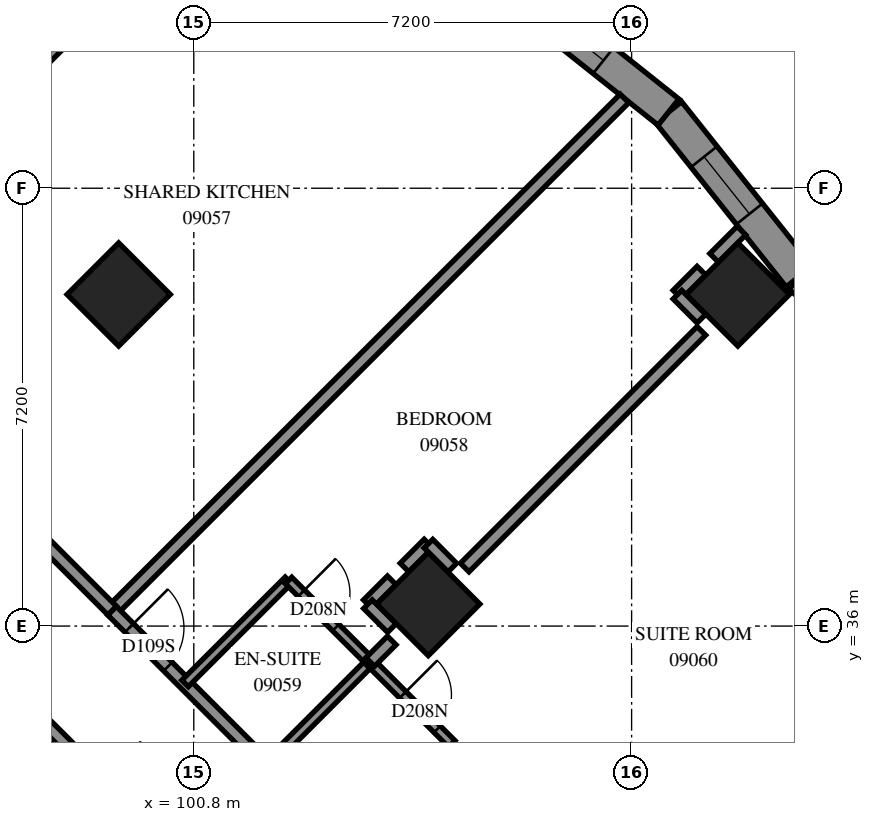
"""IFC4 building model, lengths in metres.
Left out: names, types, materials, properties, quantities, classifications, styles, units other than length and angle.
Written with IfcOpenShell. Run it as: python <this file> out.ifc"""

import sys

from ifc_helpers import new_model, si_unit, direction, frame, frame_2d, origin, origin_2d, place, context, subcontext, project, spatial, polyline, rectangle, outline, extrude, element, fill, save


model = new_model("IFC4")
c1 = context("Model", 3, precision=1e-05, world=origin(), true_north=direction((0.0, 1.0)))
c2 = subcontext(c1, "Body", "Model", "MODEL_VIEW")
j1 = project(units=[si_unit("LENGTHUNIT", "METRE"), si_unit("PLANEANGLEUNIT", "RADIAN")], contexts=[c1])
p1 = place(None, origin())
s1 = spatial("IfcSite", under=j1, at=p1, CompositionType="ELEMENT")
p2 = place(p1, origin())
s2 = spatial("IfcBuilding", under=s1, at=p2, CompositionType="ELEMENT")
p3 = place(p2, frame((0.0, 0.0, 37.2)))
s3 = spatial("IfcBuildingStorey", under=s2, at=p3, CompositionType="ELEMENT", Elevation=37.2)
for number, where, z_axis, x_axis in (
    (1, (99.565, 41.453, 0.0), (0.0, 0.0, 1.0), (0.707, -0.707, 0.0)),
    (2, (109.747, 41.453, 0.0), (0.0, 0.0, 1.0), (0.707, -0.707, 0.0)),
    (3, (104.656, 36.362, 0.0), (0.0, 0.0, 1.0), (0.707, -0.707, 0.0)),
):
    element("IfcColumn", number, at=place(p3, frame(where, z_axis=z_axis, x_axis=x_axis)), inside=s3, PredefinedType="COLUMN", context=c2, shape_type="SweptSolid", body=[
        extrude(rectangle(XDim=1.2, YDim=1.2, at=origin_2d()), origin(), (0.0, 0.0, 1.0), 3.1),
    ])
p4 = place(p3, frame((113.46, 39.599, 0.0), z_axis=(0.0, 0.0, 1.0), x_axis=(-0.7826141976, 0.6225070424, 0.0)))
e4 = element("IfcWall", 4, at=p4, inside=s3, PredefinedType="SOLIDWALL", context=c2, shape_type="SweptSolid", body=[
    extrude(outline(polyline([(-0.031, -0.275), (3.423, -0.275), (3.485, 0.275), (0.031, 0.275), (-0.031, -0.275)])), origin(), (0.0, 0.0, 1.0), 3.1),
])
p5 = place(p4, frame((1.196, 0.0, 0.5)))
e5 = element("IfcOpeningElement", 5, at=p5, cuts=e4, PredefinedType="OPENING", context=c2, shape_type="SweptSolid", body=[
    extrude(rectangle(XDim=1.2, YDim=2.45, at=frame_2d((0.6, 1.225))), frame((0.0, 0.285, 0.0), z_axis=(0.0, -1.0, 0.0), x_axis=(1.0, 0.0, 0.0)), (0.0, 0.0, 1.0), 0.57),
])
p6 = place(p3, frame((110.757, 41.749, 0.0), z_axis=(0.0, 0.0, 1.0), x_axis=(-0.6225211477, 0.7826029777, 0.0)))
e6 = element("IfcWall", 6, at=p6, inside=s3, PredefinedType="SOLIDWALL", context=c2, shape_type="SweptSolid", body=[
    extrude(outline(polyline([(0.031, -0.275), (3.485, -0.275), (3.423, 0.275), (-0.031, 0.275), (0.031, -0.275)])), origin(), (0.0, 0.0, 1.0), 3.1),
])
p7 = place(p6, frame((1.315, 0.0, 0.5)))
e7 = element("IfcOpeningElement", 7, at=p7, cuts=e6, PredefinedType="OPENING", context=c2, shape_type="SweptSolid", body=[
    extrude(rectangle(XDim=1.2, YDim=2.45, at=frame_2d((0.6, 1.225))), frame((0.0, 0.285, 0.0), z_axis=(0.0, -1.0, 0.0), x_axis=(1.0, 0.0, 0.0)), (0.0, 0.0, 1.0), 0.57),
])
p8 = place(p3, frame((108.607, 44.452, 0.0), z_axis=(0.0, 0.0, 1.0), x_axis=(-0.7826141976, 0.6225070424, 0.0)))
e8 = element("IfcWall", 8, at=p8, inside=s3, PredefinedType="SOLIDWALL", context=c2, shape_type="SweptSolid", body=[
    extrude(outline(polyline([(-0.031, -0.275), (3.423, -0.275), (3.485, 0.275), (0.031, 0.275), (-0.031, -0.275)])), origin(), (0.0, 0.0, 1.0), 3.1),
])
p9 = place(p8, frame((1.366, 0.0, 0.5)))
e9 = element("IfcOpeningElement", 9, at=p9, cuts=e8, PredefinedType="OPENING", context=c2, shape_type="SweptSolid", body=[
    extrude(rectangle(XDim=1.2, YDim=2.45, at=frame_2d((0.6, 1.225))), frame((0.0, 0.285, 0.0), z_axis=(0.0, -1.0, 0.0), x_axis=(1.0, 0.0, 0.0)), (0.0, 0.0, 1.0), 0.57),
])
p10 = place(p3, frame((99.459, 36.255, 0.0), z_axis=(0.0, 0.0, 1.0), x_axis=(0.7071907307, 0.7070228217, 0.0)))
e10 = element("IfcWall", 10, at=p10, inside=s3, PredefinedType="PARTITIONING", context=c2, shape_type="SweptSolid", body=[
    extrude(rectangle(XDim=11.911, YDim=0.2, at=frame_2d((5.956, 0.0))), origin(), (0.0, 0.0, 1.0), 3.1),
])
p11 = place(p3, frame((94.367, 41.349, 0.0), z_axis=(0.0, 0.0, 1.0), x_axis=(0.7071109931, 0.7071025693, 0.0)))
e11 = element("IfcWall", 11, at=p11, inside=s3, PredefinedType="PARTITIONING", context=c2, shape_type="SweptSolid", body=[
    extrude(rectangle(XDim=11.871, YDim=0.2, at=frame_2d((5.936, 0.0))), origin(), (0.0, 0.0, 1.0), 3.1),
])
p12 = place(p3, frame((93.59, 42.126, 0.0), z_axis=(0.0, 0.0, 1.0), x_axis=(0.7071067812, 0.7071067812, 0.0)))
e12 = element("IfcWall", 12, at=p12, inside=s3, PredefinedType="PARTITIONING", context=c2, shape_type="SweptSolid", body=[
    extrude(rectangle(XDim=9.849, YDim=0.2, at=frame_2d((4.924, 0.0))), origin(), (0.0, 0.0, 1.0), 3.1),
])
p13 = place(p12, frame((0.148, 0.0, 0.0)))
e13 = element("IfcOpeningElement", 13, at=p13, cuts=e12, PredefinedType="OPENING", context=c2, shape_type="SweptSolid", body=[
    extrude(rectangle(XDim=1.0, YDim=2.1, at=frame_2d((0.5, 1.05))), frame((0.0, 0.11, 0.0), z_axis=(0.0, -1.0, 0.0), x_axis=(1.0, 0.0, 0.0)), (0.0, 0.0, 1.0), 0.22),
])
p14 = place(p3, frame((99.455, 36.253, 0.0), z_axis=(0.0, 0.0, 1.0), x_axis=(0.7071067812, -0.7071067812, 0.0)))
e14 = element("IfcWall", 14, at=p14, inside=s3, PredefinedType="PARTITIONING", context=c2, shape_type="SweptSolid", body=[
    extrude(rectangle(XDim=7.201, YDim=0.2, at=frame_2d((3.601, 0.0))), origin(), (0.0, 0.0, 1.0), 3.1),
])
p15 = place(p14, frame((0.401, 0.0, 0.0)))
e15 = element("IfcOpeningElement", 15, at=p15, cuts=e14, PredefinedType="OPENING", context=c2, shape_type="SweptSolid", body=[
    extrude(rectangle(XDim=0.9, YDim=2.1, at=frame_2d((0.45, 1.05))), frame((0.0, 0.11, 0.0), z_axis=(0.0, -1.0, 0.0), x_axis=(1.0, 0.0, 0.0)), (0.0, 0.0, 1.0), 0.22),
])
for number, where, z_axis, x_axis in (
    (16, (110.345, 31.871, 0.0), (0.0, 0.0, 1.0), (0.707, 0.707, 0.0)),
    (17, (105.255, 36.963, 0.0), (0.0, 0.0, 1.0), (0.707, 0.707, 0.0)),
):
    element("IfcWall", number, at=place(p3, frame(where, z_axis=z_axis, x_axis=x_axis)), inside=s3, PredefinedType="PARTITIONING", context=c2, shape_type="SweptSolid", body=[
        extrude(rectangle(XDim=5.504, YDim=0.2, at=frame_2d((2.752, 0.0))), origin(), (0.0, 0.0, 1.0), 3.1),
    ])
p16 = place(p3, frame((96.913, 38.801, 0.0), z_axis=(0.0, 0.0, 1.0), x_axis=(0.7068288851, -0.7073845681, 0.0)))
e18 = element("IfcWall", 18, at=p16, inside=s3, PredefinedType="PARTITIONING", context=c2, shape_type="SweptSolid", body=[
    extrude(rectangle(XDim=3.599, YDim=0.2, at=frame_2d((1.8, 0.0))), origin(), (0.0, 0.0, 1.0), 3.1),
])
p17 = place(p3, frame((97.976, 34.772, 0.0), z_axis=(0.0, 0.0, 1.0), x_axis=(0.7073845681, -0.7068288851, 0.0)))
e19 = element("IfcWall", 19, at=p17, inside=s3, PredefinedType="PARTITIONING", context=c2, shape_type="SweptSolid", body=[
    extrude(rectangle(XDim=3.599, YDim=0.2, at=frame_2d((1.8, 0.0))), origin(), (0.0, 0.0, 1.0), 3.1),
])
p18 = place(p17, frame((1.858, 0.0, 0.0)))
e20 = element("IfcOpeningElement", 20, at=p18, cuts=e19, PredefinedType="OPENING", context=c2, shape_type="SweptSolid", body=[
    extrude(rectangle(XDim=0.9, YDim=2.1, at=frame_2d((0.45, 1.05))), frame((0.0, 0.11, 0.0), z_axis=(0.0, -1.0, 0.0), x_axis=(1.0, 0.0, 0.0)), (0.0, 0.0, 1.0), 0.22),
])
p19 = place(p3, frame((102.003, 33.711, 0.0), z_axis=(0.0, 0.0, 1.0), x_axis=(0.7071067812, 0.7071067812, 0.0)))
e21 = element("IfcWall", 21, at=p19, inside=s3, PredefinedType="PARTITIONING", context=c2, shape_type="SweptSolid", body=[
    extrude(rectangle(XDim=2.401, YDim=0.15, at=frame_2d((1.201, 0.0))), origin(), (0.0, 0.0, 1.0), 3.1),
])
for number, where, z_axis, x_axis in (
    (22, (100.657, 35.057, 0.0), (0.0, 0.0, 1.0), (0.708, 0.707, 0.0)),
    (23, (103.349, 32.365, 0.0), (0.0, 0.0, 1.0), (0.707, 0.708, 0.0)),
):
    element("IfcWall", number, at=place(p3, frame(where, z_axis=z_axis, x_axis=x_axis)), inside=s3, PredefinedType="PARTITIONING", context=c2, shape_type="SweptSolid", body=[
        extrude(rectangle(XDim=2.4, YDim=0.15, at=frame_2d((1.2, 0.0))), origin(), (0.0, 0.0, 1.0), 3.1),
    ])
p20 = place(p3, frame((103.701, 35.407, 0.0), z_axis=(0.0, 0.0, 1.0), x_axis=(0.7065800724, -0.7076330979, 0.0)))
e24 = element("IfcWall", 24, at=p20, inside=s3, PredefinedType="PARTITIONING", context=c2, shape_type="SweptSolid", body=[
    extrude(rectangle(XDim=1.899, YDim=0.15, at=frame_2d((0.95, 0.0))), origin(), (0.0, 0.0, 1.0), 3.1),
])
p21 = place(p20, frame((0.759, 0.0, 0.0)))
e25 = element("IfcOpeningElement", 25, at=p21, cuts=e24, PredefinedType="OPENING", context=c2, shape_type="SweptSolid", body=[
    extrude(rectangle(XDim=0.8, YDim=2.1, at=frame_2d((0.4, 1.05))), frame((0.0, 0.085, 0.0), z_axis=(0.0, -1.0, 0.0), x_axis=(1.0, 0.0, 0.0)), (0.0, 0.0, 1.0), 0.17),
])
p22 = place(p3, frame((102.358, 36.75, 0.0), z_axis=(0.0, 0.0, 1.0), x_axis=(0.7076330979, -0.7065800724, 0.0)))
e26 = element("IfcWall", 26, at=p22, inside=s3, PredefinedType="PARTITIONING", context=c2, shape_type="SweptSolid", body=[
    extrude(rectangle(XDim=1.899, YDim=0.15, at=frame_2d((0.95, 0.0))), origin(), (0.0, 0.0, 1.0), 3.1),
])
p23 = place(p22, frame((0.296, 0.0, 0.0)))
e27 = element("IfcOpeningElement", 27, at=p23, cuts=e26, PredefinedType="OPENING", context=c2, shape_type="SweptSolid", body=[
    extrude(rectangle(XDim=0.8, YDim=2.1, at=frame_2d((0.4, 1.05))), frame((0.0, 0.085, 0.0), z_axis=(0.0, -1.0, 0.0), x_axis=(1.0, 0.0, 0.0)), (0.0, 0.0, 1.0), 0.17),
])
p24 = place(p3, frame((109.357, 42.055, 0.0), z_axis=(0.0, 0.0, 1.0), x_axis=(0.7071067812, 0.7071067812, 0.0)))
e28 = element("IfcWall", 28, at=p24, inside=s3, PredefinedType="PARTITIONING", context=c2, shape_type="SweptSolid", body=[
    extrude(rectangle(XDim=0.634, YDim=0.2, at=frame_2d((0.317, 0.0))), origin(), (0.0, 0.0, 1.0), 3.1),
])
for number, where, z_axis, x_axis in (
    (29, (108.753, 41.451, 0.0), (0.0, 0.0, 1.0), (0.707, 0.707, 0.0)),
    (30, (108.754, 41.45, 0.0), (0.0, 0.0, 1.0), (0.707, -0.707, 0.0)),
    (31, (103.661, 36.359, 0.0), (0.0, 0.0, 1.0), (0.707, 0.707, 0.0)),
    (32, (104.265, 36.963, 0.0), (0.0, 0.0, 1.0), (0.707, 0.707, 0.0)),
):
    element("IfcWall", number, at=place(p3, frame(where, z_axis=z_axis, x_axis=x_axis)), inside=s3, PredefinedType="PARTITIONING", context=c2, shape_type="SweptSolid", body=[
        extrude(rectangle(XDim=0.557, YDim=0.2, at=frame_2d((0.279, 0.0))), origin(), (0.0, 0.0, 1.0), 3.1),
    ])
for number, where, z_axis, x_axis in (
    (33, (104.659, 37.355, 0.0), (0.0, 0.0, 1.0), (0.705, -0.709, 0.0)),
    (34, (103.664, 36.36, 0.0), (0.0, 0.0, 1.0), (0.709, -0.705, 0.0)),
):
    element("IfcWall", number, at=place(p3, frame(where, z_axis=z_axis, x_axis=x_axis)), inside=s3, PredefinedType="PARTITIONING", context=c2, shape_type="SweptSolid", body=[
        extrude(rectangle(XDim=0.556, YDim=0.2, at=frame_2d((0.278, 0.0))), origin(), (0.0, 0.0, 1.0), 3.1),
    ])
p25 = place(p3, frame((103.701, 35.409, 0.0), z_axis=(0.0, 0.0, 1.0), x_axis=(0.7071067812, 0.7071067812, 0.0)))
e35 = element("IfcWall", 35, at=p25, inside=s3, PredefinedType="PARTITIONING", context=c2, shape_type="SweptSolid", body=[
    extrude(rectangle(XDim=0.501, YDim=0.2, at=frame_2d((0.25, 0.0))), origin(), (0.0, 0.0, 1.0), 3.1),
])
p26 = place(p7, origin())
e36 = element("IfcWindow", 36, at=p26, inside=s3, PartitioningType="SINGLE_PANEL", PredefinedType="WINDOW", context=c2, shape_type="SweptSolid", body=[
    extrude(rectangle(XDim=1.2, YDim=2.45, at=frame_2d((0.6, 1.225))), frame((0.0, 0.155, 0.0), z_axis=(0.0, -1.0, 0.0), x_axis=(1.0, 0.0, 0.0)), (0.0, 0.0, 1.0), 0.06),
])
fill(e7, e36)
p27 = place(p9, origin())
e37 = element("IfcWindow", 37, at=p27, inside=s3, PartitioningType="SINGLE_PANEL", PredefinedType="WINDOW", context=c2, shape_type="SweptSolid", body=[
    extrude(rectangle(XDim=1.2, YDim=2.45, at=frame_2d((0.6, 1.225))), frame((0.0, 0.155, 0.0), z_axis=(0.0, -1.0, 0.0), x_axis=(1.0, 0.0, 0.0)), (0.0, 0.0, 1.0), 0.06),
])
fill(e9, e37)
p28 = place(p15, origin())
e38 = element("IfcDoor", 38, at=p28, inside=s3, OperationType="SINGLE_SWING_RIGHT", PredefinedType="DOOR", context=c2, shape_type="SweptSolid", body=[
    extrude(rectangle(XDim=0.9, YDim=2.1, at=frame_2d((0.45, 1.05))), frame((0.0, 0.025, 0.0), z_axis=(0.0, -1.0, 0.0), x_axis=(1.0, 0.0, 0.0)), (0.0, 0.0, 1.0), 0.05),
])
fill(e15, e38)
p29 = place(p23, origin())
e39 = element("IfcDoor", 39, at=p29, inside=s3, OperationType="SINGLE_SWING_RIGHT", PredefinedType="DOOR", context=c2, shape_type="SweptSolid", body=[
    extrude(rectangle(XDim=0.8, YDim=2.1, at=frame_2d((0.4, 1.05))), frame((0.0, 0.025, 0.0), z_axis=(0.0, -1.0, 0.0), x_axis=(1.0, 0.0, 0.0)), (0.0, 0.0, 1.0), 0.05),
])
fill(e27, e39)
p30 = place(p21, origin())
e40 = element("IfcDoor", 40, at=p30, inside=s3, OperationType="SINGLE_SWING_RIGHT", PredefinedType="DOOR", context=c2, shape_type="SweptSolid", body=[
    extrude(rectangle(XDim=0.8, YDim=2.1, at=frame_2d((0.4, 1.05))), frame((0.0, 0.025, 0.0), z_axis=(0.0, -1.0, 0.0), x_axis=(1.0, 0.0, 0.0)), (0.0, 0.0, 1.0), 0.05),
])
fill(e25, e40)
save(model, sys.argv[1])
